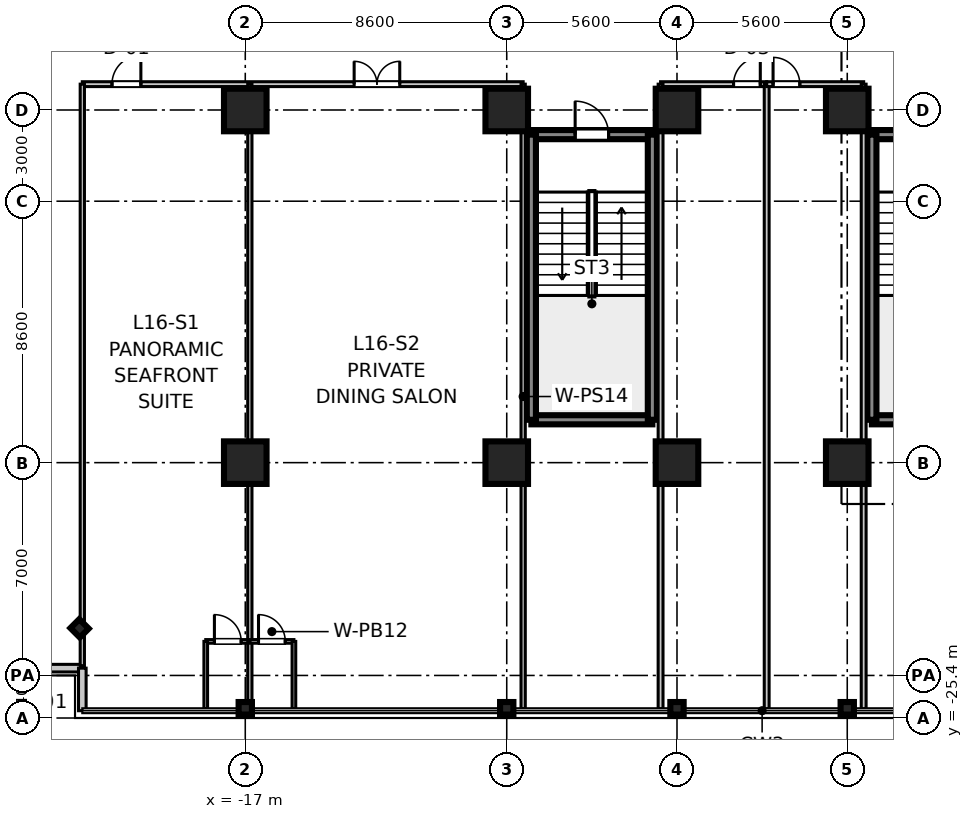
"""IFC4 building model, lengths in metres.
Left out: names, types, materials, properties, quantities, classifications, styles, units other than length and angle.
Written with IfcOpenShell. Run it as: python <this file> out.ifc"""

import sys

from ifc_helpers import new_model, si_unit, direction, frame, frame_2d, origin, origin_2d, place, context, subcontext, project, spatial, rectangle, i_section, extrude, source, transform, mapped, element, fill, save


model = new_model("IFC4")
c1 = context("Model", 3, precision=1e-05, world=origin(), true_north=direction((0.0, 1.0)))
c2 = subcontext(c1, "Body", "Model", "MODEL_VIEW")
j1 = project(units=[si_unit("LENGTHUNIT", "METRE"), si_unit("PLANEANGLEUNIT", "RADIAN")], contexts=[c1])
p1 = place(None, origin())
s1 = spatial("IfcSite", under=j1, at=p1, CompositionType="ELEMENT")
p2 = place(p1, origin())
s2 = spatial("IfcBuilding", under=s1, at=p2, CompositionType="ELEMENT")
p3 = place(p2, frame((0.0, 0.0, 68.9)))
s3 = spatial("IfcBuildingStorey", under=s2, at=p3, CompositionType="ELEMENT", Elevation=68.9)
m1 = source(origin(), c2, "Body", "SweptSolid", [
    extrude(rectangle(XDim=1.4, YDim=1.4, at=origin_2d()), origin(), (0.0, 0.0, 1.0), 3.605),
])
for number, where, z_axis, x_axis in (
    (1, (-17.0, -17.0, 0.0), (0.0, 0.0, 1.0), (1.0, 0.0, 0.0)),
    (2, (-17.0, -5.4, 0.0), (0.0, 0.0, 1.0), (1.0, 0.0, 0.0)),
    (3, (-8.4, -17.0, 0.0), (0.0, 0.0, 1.0), (1.0, 0.0, 0.0)),
    (4, (-8.4, -5.4, 0.0), (0.0, 0.0, 1.0), (1.0, 0.0, 0.0)),
    (5, (-2.8, -17.0, 0.0), (0.0, 0.0, 1.0), (1.0, 0.0, 0.0)),
    (6, (-2.8, -5.4, 0.0), (0.0, 0.0, 1.0), (1.0, 0.0, 0.0)),
    (7, (2.8, -17.0, 0.0), (0.0, 0.0, 1.0), (1.0, 0.0, 0.0)),
    (8, (2.8, -5.4, 0.0), (0.0, 0.0, 1.0), (1.0, 0.0, 0.0)),
):
    element("IfcColumn", number, at=place(p3, frame(where, z_axis=z_axis, x_axis=x_axis)), inside=s3, PredefinedType="COLUMN", context=c2, shape_type="MappedRepresentation", body=[
        mapped(m1, transform((0.0, 0.0, 0.0), scale=1.0)),
    ])
m2 = source(origin(), c2, "Body", "SweptSolid", [
    extrude(i_section(OverallWidth=0.412, OverallDepth=0.438, WebThickness=0.023, FlangeThickness=0.036, at=origin_2d()), origin(), (0.0, 0.0, 1.0), 3.605),
])
for number, where, z_axis, x_axis in (
    (9, (-17.0, -25.08, 0.0), (0.0, 0.0, 1.0), (0.0, 1.0, 0.0)),
    (10, (-8.4, -25.08, 0.0), (0.0, 0.0, 1.0), (0.0, 1.0, 0.0)),
    (11, (-2.8, -25.08, 0.0), (0.0, 0.0, 1.0), (0.0, 1.0, 0.0)),
    (12, (2.8, -25.08, 0.0), (0.0, 0.0, 1.0), (0.0, 1.0, 0.0)),
    (13, (-22.45, -22.45, 0.0), (0.0, 0.0, 1.0), (0.707, 0.707, 0.0)),
):
    element("IfcColumn", number, at=place(p3, frame(where, z_axis=z_axis, x_axis=x_axis)), inside=s3, PredefinedType="COLUMN", context=c2, shape_type="MappedRepresentation", body=[
        mapped(m2, transform((0.0, 0.0, 0.0), scale=1.0)),
    ])
m3 = source(origin(), c2, "Body", "SweptSolid", [
    extrude(rectangle(XDim=3.98, YDim=0.3, at=frame_2d((1.99, 0.0))), origin(), (0.0, 0.0, 1.0), 3.37),
])
for number, where, z_axis, x_axis in (
    (14, (3.61, -15.59, 0.0), (0.0, 0.0, 1.0), (1.0, 0.0, 0.0)),
    (15, (3.61, -6.21, 0.0), (0.0, 0.0, 1.0), (1.0, 0.0, 0.0)),
):
    element("IfcWall", number, at=place(p3, frame(where, z_axis=z_axis, x_axis=x_axis)), inside=s3, PredefinedType="SHEAR", context=c2, shape_type="MappedRepresentation", body=[
        mapped(m3, transform((0.0, 0.0, 0.0), scale=1.0)),
    ])
m4 = source(origin(), c2, "Body", "SweptSolid", [
    extrude(rectangle(XDim=9.38, YDim=0.3, at=frame_2d((4.69, 0.0))), origin(), (0.0, 0.0, 1.0), 3.37),
])
p4 = place(p3, frame((3.61, -15.59, 0.0), z_axis=(0.0, 0.0, 1.0), x_axis=(0.0, 1.0, 0.0)))
e16 = element("IfcWall", 16, at=p4, inside=s3, PredefinedType="SHEAR", context=c2, shape_type="MappedRepresentation", body=[
    mapped(m4, transform((0.0, 0.0, 0.0), scale=1.0)),
])
p5 = place(p3, frame((-7.59, -15.59, 0.0), z_axis=(0.0, 0.0, 1.0), x_axis=(1.0, 0.0, 0.0)))
e17 = element("IfcWall", 17, at=p5, inside=s3, PredefinedType="SHEAR", context=c2, shape_type="MappedRepresentation", body=[
    mapped(m3, transform((0.0, 0.0, 0.0), scale=1.0)),
])
p6 = place(p3, frame((-7.59, -6.21, 0.0), z_axis=(0.0, 0.0, 1.0), x_axis=(1.0, 0.0, 0.0)))
e18 = element("IfcWall", 18, at=p6, inside=s3, PredefinedType="SHEAR", context=c2, shape_type="MappedRepresentation", body=[
    mapped(m3, transform((0.0, 0.0, 0.0), scale=1.0)),
])
p7 = place(p6, frame((1.44, 0.0, 0.0)))
e19 = element("IfcOpeningElement", 19, at=p7, cuts=e18, PredefinedType="OPENING", context=c2, shape_type="SweptSolid", body=[
    extrude(rectangle(XDim=1.1, YDim=2.15, at=frame_2d((0.55, 1.075))), frame((0.0, 0.16, 0.0), z_axis=(0.0, -1.0, 0.0), x_axis=(1.0, 0.0, 0.0)), (0.0, 0.0, 1.0), 0.32),
])
for number, where, z_axis, x_axis in (
    (20, (-7.59, -15.59, 0.0), (0.0, 0.0, 1.0), (0.0, 1.0, 0.0)),
    (21, (-3.61, -15.59, 0.0), (0.0, 0.0, 1.0), (0.0, 1.0, 0.0)),
):
    element("IfcWall", number, at=place(p3, frame(where, z_axis=z_axis, x_axis=x_axis)), inside=s3, PredefinedType="SHEAR", context=c2, shape_type="MappedRepresentation", body=[
        mapped(m4, transform((0.0, 0.0, 0.0), scale=1.0)),
    ])
m5 = source(origin(), c2, "Body", "SweptSolid", [
    extrude(rectangle(XDim=1.4, YDim=0.25, at=frame_2d((0.7, 0.0))), origin(), (0.0, 0.0, 1.0), 3.37),
])
for number, where, z_axis, x_axis in (
    (22, (-23.76, -23.76, 0.0), (0.0, 0.0, 1.0), (1.0, 0.0, 0.0)),
    (23, (-22.36, -25.16, 0.0), (0.0, 0.0, 1.0), (0.0, 1.0, 0.0)),
):
    element("IfcWall", number, at=place(p3, frame(where, z_axis=z_axis, x_axis=x_axis)), inside=s3, PredefinedType="STANDARD", context=c2, shape_type="MappedRepresentation", body=[
        mapped(m5, transform((0.0, 0.0, 0.0), scale=1.0)),
    ])
m6 = source(origin(), c2, "Body", "SweptSolid", [
    extrude(rectangle(XDim=14.5, YDim=0.16, at=frame_2d((7.25, 0.0))), origin(), (0.0, 0.0, 1.0), 2.71),
])
p8 = place(p3, frame((-22.36, -4.55, 0.0), z_axis=(0.0, 0.0, 1.0), x_axis=(1.0, 0.0, 0.0)))
e24 = element("IfcWall", 24, at=p8, inside=s3, PredefinedType="PARTITIONING", context=c2, shape_type="MappedRepresentation", body=[
    mapped(m6, transform((0.0, 0.0, 0.0), scale=1.0)),
])
p9 = place(p8, frame((0.976, 0.0, 0.0)))
e25 = element("IfcOpeningElement", 25, at=p9, cuts=e24, PredefinedType="OPENING", context=c2, shape_type="SweptSolid", body=[
    extrude(rectangle(XDim=0.95, YDim=2.1, at=frame_2d((0.475, 1.05))), frame((0.0, 0.09, 0.0), z_axis=(0.0, -1.0, 0.0), x_axis=(1.0, 0.0, 0.0)), (0.0, 0.0, 1.0), 0.18),
])
p10 = place(p8, frame((8.941, 0.0, 0.0)))
e26 = element("IfcOpeningElement", 26, at=p10, cuts=e24, PredefinedType="OPENING", context=c2, shape_type="SweptSolid", body=[
    extrude(rectangle(XDim=1.5, YDim=2.15, at=frame_2d((0.75, 1.075))), frame((0.0, 0.09, 0.0), z_axis=(0.0, -1.0, 0.0), x_axis=(1.0, 0.0, 0.0)), (0.0, 0.0, 1.0), 0.18),
])
m7 = source(origin(), c2, "Body", "SweptSolid", [
    extrude(rectangle(XDim=19.13, YDim=0.14, at=frame_2d((9.565, 0.0))), origin(), (0.0, 0.0, 1.0), 2.71),
])
p11 = place(p3, frame((-22.36, -23.68, 0.0), z_axis=(0.0, 0.0, 1.0), x_axis=(0.0, 1.0, 0.0)))
e27 = element("IfcWall", 27, at=p11, inside=s3, PredefinedType="PARTITIONING", context=c2, shape_type="MappedRepresentation", body=[
    mapped(m7, transform((0.0, 0.0, 0.0), scale=1.0)),
])
m8 = source(origin(), c2, "Body", "SweptSolid", [
    extrude(rectangle(XDim=20.55, YDim=0.14, at=frame_2d((10.275, 0.0))), origin(), (0.0, 0.0, 1.0), 2.71),
])
p12 = place(p3, frame((-7.86, -25.1, 0.0), z_axis=(0.0, 0.0, 1.0), x_axis=(0.0, 1.0, 0.0)))
e28 = element("IfcWall", 28, at=p12, inside=s3, PredefinedType="PARTITIONING", context=c2, shape_type="MappedRepresentation", body=[
    mapped(m8, transform((0.0, 0.0, 0.0), scale=1.0)),
])
m9 = source(origin(), c2, "Body", "SweptSolid", [
    extrude(rectangle(XDim=1.45, YDim=0.12, at=frame_2d((0.725, 0.0))), origin(), (0.0, 0.0, 1.0), 2.71),
])
p13 = place(p3, frame((-18.3, -22.88, 0.0), z_axis=(0.0, 0.0, 1.0), x_axis=(1.0, 0.0, 0.0)))
e29 = element("IfcWall", 29, at=p13, inside=s3, PredefinedType="PARTITIONING", context=c2, shape_type="MappedRepresentation", body=[
    mapped(m9, transform((0.0, 0.0, 0.0), scale=1.0)),
])
p14 = place(p13, frame((0.285, 0.0, 0.0)))
e30 = element("IfcOpeningElement", 30, at=p14, cuts=e29, PredefinedType="OPENING", context=c2, shape_type="SweptSolid", body=[
    extrude(rectangle(XDim=0.88, YDim=2.1, at=frame_2d((0.44, 1.05))), frame((0.0, 0.07, 0.0), z_axis=(0.0, -1.0, 0.0), x_axis=(1.0, 0.0, 0.0)), (0.0, 0.0, 1.0), 0.14),
])
m10 = source(origin(), c2, "Body", "SweptSolid", [
    extrude(rectangle(XDim=2.22, YDim=0.12, at=frame_2d((1.11, 0.0))), origin(), (0.0, 0.0, 1.0), 2.71),
])
p15 = place(p3, frame((-18.3, -25.1, 0.0), z_axis=(0.0, 0.0, 1.0), x_axis=(0.0, 1.0, 0.0)))
e31 = element("IfcWall", 31, at=p15, inside=s3, PredefinedType="PARTITIONING", context=c2, shape_type="MappedRepresentation", body=[
    mapped(m10, transform((0.0, 0.0, 0.0), scale=1.0)),
])
p16 = place(p3, frame((-16.85, -25.1, 0.0), z_axis=(0.0, 0.0, 1.0), x_axis=(0.0, 1.0, 0.0)))
e32 = element("IfcWall", 32, at=p16, inside=s3, PredefinedType="PARTITIONING", context=c2, shape_type="MappedRepresentation", body=[
    mapped(m8, transform((0.0, 0.0, 0.0), scale=1.0)),
])
m11 = source(origin(), c2, "Body", "SweptSolid", [
    extrude(rectangle(XDim=1.45, YDim=0.12, at=frame_2d((0.725, 0.0))), origin(), (0.0, 0.0, 1.0), 2.71),
])
p17 = place(p3, frame((-16.85, -22.88, 0.0), z_axis=(0.0, 0.0, 1.0), x_axis=(1.0, 0.0, 0.0)))
e33 = element("IfcWall", 33, at=p17, inside=s3, PredefinedType="PARTITIONING", context=c2, shape_type="MappedRepresentation", body=[
    mapped(m11, transform((0.0, 0.0, 0.0), scale=1.0)),
])
p18 = place(p17, frame((0.285, 0.0, 0.0)))
e34 = element("IfcOpeningElement", 34, at=p18, cuts=e33, PredefinedType="OPENING", context=c2, shape_type="SweptSolid", body=[
    extrude(rectangle(XDim=0.88, YDim=2.1, at=frame_2d((0.44, 1.05))), frame((0.0, 0.07, 0.0), z_axis=(0.0, -1.0, 0.0), x_axis=(1.0, 0.0, 0.0)), (0.0, 0.0, 1.0), 0.14),
])
p19 = place(p3, frame((-15.4, -25.1, 0.0), z_axis=(0.0, 0.0, 1.0), x_axis=(0.0, 1.0, 0.0)))
e35 = element("IfcWall", 35, at=p19, inside=s3, PredefinedType="PARTITIONING", context=c2, shape_type="MappedRepresentation", body=[
    mapped(m10, transform((0.0, 0.0, 0.0), scale=1.0)),
])
m12 = source(origin(), c2, "Body", "SweptSolid", [
    extrude(rectangle(XDim=3.49, YDim=0.16, at=frame_2d((1.745, 0.0))), origin(), (0.0, 0.0, 1.0), 2.71),
])
p20 = place(p3, frame((-3.34, -4.55, 0.0), z_axis=(0.0, 0.0, 1.0), x_axis=(1.0, 0.0, 0.0)))
e36 = element("IfcWall", 36, at=p20, inside=s3, PredefinedType="PARTITIONING", context=c2, shape_type="MappedRepresentation", body=[
    mapped(m12, transform((0.0, 0.0, 0.0), scale=1.0)),
])
p21 = place(p20, frame((2.4, 0.0, 0.0)))
e37 = element("IfcOpeningElement", 37, at=p21, cuts=e36, PredefinedType="OPENING", context=c2, shape_type="SweptSolid", body=[
    extrude(rectangle(XDim=0.88, YDim=2.1, at=frame_2d((0.44, 1.05))), frame((0.0, 0.09, 0.0), z_axis=(0.0, -1.0, 0.0), x_axis=(1.0, 0.0, 0.0)), (0.0, 0.0, 1.0), 0.18),
])
m13 = source(origin(), c2, "Body", "SweptSolid", [
    extrude(rectangle(XDim=20.55, YDim=0.16, at=frame_2d((10.275, 0.0))), origin(), (0.0, 0.0, 1.0), 2.71),
])
for number, where, z_axis, x_axis in (
    (38, (-3.34, -25.1, 0.0), (0.0, 0.0, 1.0), (0.0, 1.0, 0.0)),
    (39, (0.15, -25.1, 0.0), (0.0, 0.0, 1.0), (0.0, 1.0, 0.0)),
):
    element("IfcWall", number, at=place(p3, frame(where, z_axis=z_axis, x_axis=x_axis)), inside=s3, PredefinedType="PARTITIONING", context=c2, shape_type="MappedRepresentation", body=[
        mapped(m13, transform((0.0, 0.0, 0.0), scale=1.0)),
    ])
m14 = source(origin(), c2, "Body", "SweptSolid", [
    extrude(rectangle(XDim=3.19, YDim=0.16, at=frame_2d((1.595, 0.0))), origin(), (0.0, 0.0, 1.0), 2.71),
])
p22 = place(p3, frame((0.15, -4.55, 0.0), z_axis=(0.0, 0.0, 1.0), x_axis=(1.0, 0.0, 0.0)))
e40 = element("IfcWall", 40, at=p22, inside=s3, PredefinedType="PARTITIONING", context=c2, shape_type="MappedRepresentation", body=[
    mapped(m14, transform((0.0, 0.0, 0.0), scale=1.0)),
])
p23 = place(p22, frame((0.21, 0.0, 0.0)))
e41 = element("IfcOpeningElement", 41, at=p23, cuts=e40, PredefinedType="OPENING", context=c2, shape_type="SweptSolid", body=[
    extrude(rectangle(XDim=0.88, YDim=2.1, at=frame_2d((0.44, 1.05))), frame((0.0, 0.09, 0.0), z_axis=(0.0, -1.0, 0.0), x_axis=(1.0, 0.0, 0.0)), (0.0, 0.0, 1.0), 0.18),
])
p24 = place(p3, frame((3.34, -25.1, 0.0), z_axis=(0.0, 0.0, 1.0), x_axis=(0.0, 1.0, 0.0)))
e42 = element("IfcWall", 42, at=p24, inside=s3, PredefinedType="PARTITIONING", context=c2, shape_type="MappedRepresentation", body=[
    mapped(m13, transform((0.0, 0.0, 0.0), scale=1.0)),
])
m15 = source(origin(), c2, "Body", "SweptSolid", [
    extrude(rectangle(XDim=1.1, YDim=2.15, at=frame_2d((0.55, 1.075))), frame((0.0, 0.025, 0.0), z_axis=(0.0, -1.0, 0.0), x_axis=(1.0, 0.0, 0.0)), (0.0, 0.0, 1.0), 0.05),
])
p25 = place(p7, frame((1.1, 0.0, 0.0), z_axis=(0.0, 0.0, 1.0), x_axis=(-1.0, 0.0, 0.0)))
e43 = element("IfcDoor", 43, at=p25, inside=s3, OperationType="SINGLE_SWING_LEFT", PredefinedType="DOOR", context=c2, shape_type="MappedRepresentation", body=[
    mapped(m15, transform((0.0, 0.0, 0.0), scale=1.0)),
])
fill(e19, e43)
m16 = source(origin(), c2, "Body", "SweptSolid", [
    extrude(rectangle(XDim=0.88, YDim=2.1, at=frame_2d((0.44, 1.05))), frame((0.0, 0.025, 0.0), z_axis=(0.0, -1.0, 0.0), x_axis=(1.0, 0.0, 0.0)), (0.0, 0.0, 1.0), 0.05),
])
p26 = place(p14, frame((0.88, 0.0, 0.0), z_axis=(0.0, 0.0, 1.0), x_axis=(-1.0, 0.0, 0.0)))
e44 = element("IfcDoor", 44, at=p26, inside=s3, OperationType="SINGLE_SWING_LEFT", PredefinedType="DOOR", context=c2, shape_type="MappedRepresentation", body=[
    mapped(m16, transform((0.0, 0.0, 0.0), scale=1.0)),
])
fill(e30, e44)
m17 = source(origin(), c2, "Body", "SweptSolid", [
    extrude(rectangle(XDim=0.95, YDim=2.1, at=frame_2d((0.475, 1.05))), frame((0.0, 0.025, 0.0), z_axis=(0.0, -1.0, 0.0), x_axis=(1.0, 0.0, 0.0)), (0.0, 0.0, 1.0), 0.05),
])
p27 = place(p9, frame((0.95, 0.0, 0.0), z_axis=(0.0, 0.0, 1.0), x_axis=(-1.0, 0.0, 0.0)))
e45 = element("IfcDoor", 45, at=p27, inside=s3, OperationType="SINGLE_SWING_RIGHT", PredefinedType="DOOR", context=c2, shape_type="MappedRepresentation", body=[
    mapped(m17, transform((0.0, 0.0, 0.0), scale=1.0)),
])
fill(e25, e45)
p28 = place(p18, frame((0.88, 0.0, 0.0), z_axis=(0.0, 0.0, 1.0), x_axis=(-1.0, 0.0, 0.0)))
e46 = element("IfcDoor", 46, at=p28, inside=s3, OperationType="SINGLE_SWING_LEFT", PredefinedType="DOOR", context=c2, shape_type="MappedRepresentation", body=[
    mapped(m16, transform((0.0, 0.0, 0.0), scale=1.0)),
])
fill(e34, e46)
m18 = source(origin(), c2, "Body", "SweptSolid", [
    extrude(rectangle(XDim=1.5, YDim=2.15, at=frame_2d((0.75, 1.075))), frame((0.0, 0.025, 0.0), z_axis=(0.0, -1.0, 0.0), x_axis=(1.0, 0.0, 0.0)), (0.0, 0.0, 1.0), 0.05),
])
p29 = place(p10, frame((1.5, 0.0, 0.0), z_axis=(0.0, 0.0, 1.0), x_axis=(-1.0, 0.0, 0.0)))
e47 = element("IfcDoor", 47, at=p29, inside=s3, OperationType="DOUBLE_DOOR_SINGLE_SWING", PredefinedType="DOOR", context=c2, shape_type="MappedRepresentation", body=[
    mapped(m18, transform((0.0, 0.0, 0.0), scale=1.0)),
])
fill(e26, e47)
p30 = place(p21, frame((0.88, 0.0, 0.0), z_axis=(0.0, 0.0, 1.0), x_axis=(-1.0, 0.0, 0.0)))
e48 = element("IfcDoor", 48, at=p30, inside=s3, OperationType="SINGLE_SWING_RIGHT", PredefinedType="DOOR", context=c2, shape_type="MappedRepresentation", body=[
    mapped(m16, transform((0.0, 0.0, 0.0), scale=1.0)),
])
fill(e37, e48)
p31 = place(p23, frame((0.88, 0.0, 0.0), z_axis=(0.0, 0.0, 1.0), x_axis=(-1.0, 0.0, 0.0)))
e49 = element("IfcDoor", 49, at=p31, inside=s3, OperationType="SINGLE_SWING_LEFT", PredefinedType="DOOR", context=c2, shape_type="MappedRepresentation", body=[
    mapped(m16, transform((0.0, 0.0, 0.0), scale=1.0)),
])
fill(e41, e49)
save(model, sys.argv[1])
